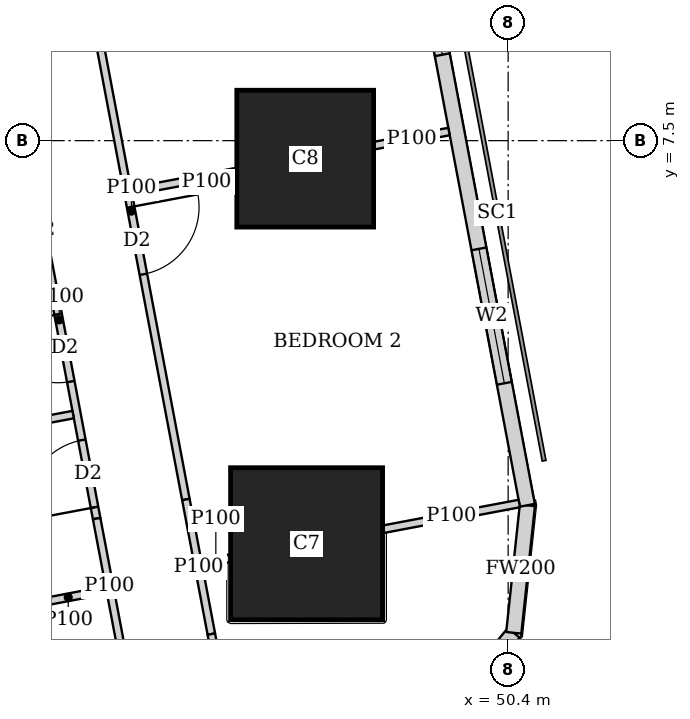
"""IFC4 building model, lengths in metres.
Left out: names, types, materials, properties, quantities, classifications, styles, units other than length and angle.
Written with IfcOpenShell. Run it as: python <this file> out.ifc"""

import sys

from ifc_helpers import new_model, si_unit, direction, frame, frame_2d, origin, origin_2d, place, context, subcontext, project, spatial, rectangle, extrude, element, fill, save


model = new_model("IFC4")
c1 = context("Model", 3, precision=1e-05, world=origin(), true_north=direction((0.0, 1.0)))
c2 = subcontext(c1, "Body", "Model", "MODEL_VIEW")
j1 = project(units=[si_unit("LENGTHUNIT", "METRE"), si_unit("PLANEANGLEUNIT", "RADIAN")], contexts=[c1])
p1 = place(None, origin())
s1 = spatial("IfcSite", under=j1, at=p1, CompositionType="ELEMENT")
p2 = place(p1, origin())
s2 = spatial("IfcBuilding", under=s1, at=p2, CompositionType="ELEMENT")
p3 = place(p2, frame((0.0, 0.0, 180.8)))
s3 = spatial("IfcBuildingStorey", under=s2, at=p3, CompositionType="ELEMENT", Elevation=180.8)
p4 = place(p3, frame((47.748, 2.197, 0.0), z_axis=(0.0, 0.0, 1.0), x_axis=(1.0, 0.0, 0.0)))
e1 = element("IfcColumn", 1, at=p4, inside=s3, PredefinedType="COLUMN", context=c2, shape_type="SweptSolid", body=[
    extrude(rectangle(XDim=2.0, YDim=2.0, at=origin_2d()), origin(), (0.0, 0.0, 1.0), 3.75),
])
p5 = place(p3, frame((47.73, 7.263, 0.0), z_axis=(0.0, 0.0, 1.0), x_axis=(1.0, 0.0, 0.0)))
e2 = element("IfcColumn", 2, at=p5, inside=s3, PredefinedType="COLUMN", context=c2, shape_type="SweptSolid", body=[
    extrude(rectangle(XDim=1.8, YDim=1.8, at=origin_2d()), origin(), (0.0, 0.0, 1.0), 3.75),
])
p6 = place(p3, frame((49.407, -0.263, 0.0), z_axis=(0.0, 0.0, 1.0), x_axis=(0.638042593423, 0.770001070764, 0.0)))
e3 = element("IfcWall", 3, at=p6, inside=s3, PredefinedType="SOLIDWALL", context=c2, shape_type="SweptSolid", body=[
    extrude(rectangle(XDim=1.673, YDim=0.2, at=frame_2d((0.836, 0.0))), origin(), (0.0, 0.0, 1.0), 3.5),
])
p7 = place(p3, frame((50.474, 1.025, 0.0), z_axis=(0.0, 0.0, 1.0), x_axis=(0.106047815515, 0.994361031429, 0.0)))
e4 = element("IfcWall", 4, at=p7, inside=s3, PredefinedType="SOLIDWALL", context=c2, shape_type="SweptSolid", body=[
    extrude(rectangle(XDim=1.688, YDim=0.2, at=frame_2d((0.844, 0.0))), origin(), (0.0, 0.0, 1.0), 3.5),
])
p8 = place(p3, frame((50.653, 2.703, 0.0), z_axis=(0.0, 0.0, 1.0), x_axis=(-0.185612026696, 0.982623109613, 0.0)))
e5 = element("IfcWall", 5, at=p8, inside=s3, PredefinedType="SOLIDWALL", context=c2, shape_type="SweptSolid", body=[
    extrude(rectangle(XDim=41.393, YDim=0.2, at=frame_2d((20.697, 0.0))), origin(), (0.0, 0.0, 1.0), 3.5),
])
p9 = place(p8, frame((1.633, 0.0, 0.9)))
e6 = element("IfcOpeningElement", 6, at=p9, cuts=e5, PredefinedType="OPENING", context=c2, shape_type="SweptSolid", body=[
    extrude(rectangle(XDim=1.8, YDim=1.5, at=frame_2d((0.9, 0.75))), frame((0.0, 0.11, 0.0), z_axis=(0.0, -1.0, 0.0), x_axis=(1.0, 0.0, 0.0)), (0.0, 0.0, 1.0), 0.22),
])
p10 = place(p8, frame((6.032, 0.0, 0.9)))
e7 = element("IfcOpeningElement", 7, at=p10, cuts=e5, PredefinedType="OPENING", context=c2, shape_type="SweptSolid", body=[
    extrude(rectangle(XDim=1.8, YDim=1.5, at=frame_2d((0.9, 0.75))), frame((0.0, 0.11, 0.0), z_axis=(0.0, -1.0, 0.0), x_axis=(1.0, 0.0, 0.0)), (0.0, 0.0, 1.0), 0.22),
])
p11 = place(p8, frame((9.848, 0.0, 0.9)))
e8 = element("IfcOpeningElement", 8, at=p11, cuts=e5, PredefinedType="OPENING", context=c2, shape_type="SweptSolid", body=[
    extrude(rectangle(XDim=1.8, YDim=1.5, at=frame_2d((0.9, 0.75))), frame((0.0, 0.11, 0.0), z_axis=(0.0, -1.0, 0.0), x_axis=(1.0, 0.0, 0.0)), (0.0, 0.0, 1.0), 0.22),
])
p12 = place(p8, frame((13.664, 0.0, 0.9)))
e9 = element("IfcOpeningElement", 9, at=p12, cuts=e5, PredefinedType="OPENING", context=c2, shape_type="SweptSolid", body=[
    extrude(rectangle(XDim=1.8, YDim=1.5, at=frame_2d((0.9, 0.75))), frame((0.0, 0.11, 0.0), z_axis=(0.0, -1.0, 0.0), x_axis=(1.0, 0.0, 0.0)), (0.0, 0.0, 1.0), 0.22),
])
p13 = place(p8, frame((17.481, 0.0, 0.9)))
e10 = element("IfcOpeningElement", 10, at=p13, cuts=e5, PredefinedType="OPENING", context=c2, shape_type="SweptSolid", body=[
    extrude(rectangle(XDim=1.8, YDim=1.5, at=frame_2d((0.9, 0.75))), frame((0.0, 0.11, 0.0), z_axis=(0.0, -1.0, 0.0), x_axis=(1.0, 0.0, 0.0)), (0.0, 0.0, 1.0), 0.22),
])
p14 = place(p8, frame((21.297, 0.0, 0.9)))
e11 = element("IfcOpeningElement", 11, at=p14, cuts=e5, PredefinedType="OPENING", context=c2, shape_type="SweptSolid", body=[
    extrude(rectangle(XDim=1.8, YDim=1.5, at=frame_2d((0.9, 0.75))), frame((0.0, 0.11, 0.0), z_axis=(0.0, -1.0, 0.0), x_axis=(1.0, 0.0, 0.0)), (0.0, 0.0, 1.0), 0.22),
])
p15 = place(p8, frame((25.113, 0.0, 0.9)))
e12 = element("IfcOpeningElement", 12, at=p15, cuts=e5, PredefinedType="OPENING", context=c2, shape_type="SweptSolid", body=[
    extrude(rectangle(XDim=1.8, YDim=1.5, at=frame_2d((0.9, 0.75))), frame((0.0, 0.11, 0.0), z_axis=(0.0, -1.0, 0.0), x_axis=(1.0, 0.0, 0.0)), (0.0, 0.0, 1.0), 0.22),
])
p16 = place(p8, frame((28.93, 0.0, 0.9)))
e13 = element("IfcOpeningElement", 13, at=p16, cuts=e5, PredefinedType="OPENING", context=c2, shape_type="SweptSolid", body=[
    extrude(rectangle(XDim=1.8, YDim=1.5, at=frame_2d((0.9, 0.75))), frame((0.0, 0.11, 0.0), z_axis=(0.0, -1.0, 0.0), x_axis=(1.0, 0.0, 0.0)), (0.0, 0.0, 1.0), 0.22),
])
p17 = place(p8, frame((32.746, 0.0, 0.9)))
e14 = element("IfcOpeningElement", 14, at=p17, cuts=e5, PredefinedType="OPENING", context=c2, shape_type="SweptSolid", body=[
    extrude(rectangle(XDim=1.8, YDim=1.5, at=frame_2d((0.9, 0.75))), frame((0.0, 0.11, 0.0), z_axis=(0.0, -1.0, 0.0), x_axis=(1.0, 0.0, 0.0)), (0.0, 0.0, 1.0), 0.22),
])
p18 = place(p8, frame((36.481, 0.0, 0.9)))
e15 = element("IfcOpeningElement", 15, at=p18, cuts=e5, PredefinedType="OPENING", context=c2, shape_type="SweptSolid", body=[
    extrude(rectangle(XDim=1.8, YDim=1.5, at=frame_2d((0.9, 0.75))), frame((0.0, 0.11, 0.0), z_axis=(0.0, -1.0, 0.0), x_axis=(1.0, 0.0, 0.0)), (0.0, 0.0, 1.0), 0.22),
])
p19 = place(p3, frame((44.727, 10.366, 0.0), z_axis=(0.0, 0.0, 1.0), x_axis=(0.185578957652, -0.982629355595, 0.0)))
e16 = element("IfcWall", 16, at=p19, inside=s3, PredefinedType="PARTITIONING", context=c2, shape_type="SweptSolid", body=[
    extrude(rectangle(XDim=7.721, YDim=0.1, at=frame_2d((3.86, 0.0))), origin(), (0.0, 0.0, 1.0), 3.5),
])
p20 = place(p19, frame((0.151, 0.0, 0.0)))
e17 = element("IfcOpeningElement", 17, at=p20, cuts=e16, PredefinedType="OPENING", context=c2, shape_type="SweptSolid", body=[
    extrude(rectangle(XDim=0.9, YDim=2.1, at=frame_2d((0.45, 1.05))), frame((0.0, 0.06, 0.0), z_axis=(0.0, -1.0, 0.0), x_axis=(1.0, 0.0, 0.0)), (0.0, 0.0, 1.0), 0.12),
])
p21 = place(p19, frame((3.806, 0.0, 0.0)))
e18 = element("IfcOpeningElement", 18, at=p21, cuts=e16, PredefinedType="OPENING", context=c2, shape_type="SweptSolid", body=[
    extrude(rectangle(XDim=0.9, YDim=2.1, at=frame_2d((0.45, 1.05))), frame((0.0, 0.06, 0.0), z_axis=(0.0, -1.0, 0.0), x_axis=(1.0, 0.0, 0.0)), (0.0, 0.0, 1.0), 0.12),
])
p22 = place(p3, frame((46.16, 2.779, 0.0), z_axis=(0.0, 0.0, 1.0), x_axis=(0.18597295662, -0.982554863306, 0.0)))
e19 = element("IfcWall", 19, at=p22, inside=s3, PredefinedType="PARTITIONING", context=c2, shape_type="SweptSolid", body=[
    extrude(rectangle(XDim=1.802, YDim=0.1, at=frame_2d((0.901, 0.0))), origin(), (0.0, 0.0, 1.0), 2.1),
])
p23 = place(p3, frame((46.495, 1.008, 0.0), z_axis=(0.0, 0.0, 1.0), x_axis=(0.185535059532, -0.982637645159, 0.0)))
e20 = element("IfcWall", 20, at=p23, inside=s3, PredefinedType="PARTITIONING", context=c2, shape_type="SweptSolid", body=[
    extrude(rectangle(XDim=1.644, YDim=0.1, at=frame_2d((0.822, 0.0))), origin(), (0.0, 0.0, 1.0), 3.5),
])
p24 = place(p3, frame((43.999, 7.755, 0.0), z_axis=(0.0, 0.0, 1.0), x_axis=(0.185565904578, -0.982631820703, 0.0)))
e21 = element("IfcWall", 21, at=p24, inside=s3, PredefinedType="PARTITIONING", context=c2, shape_type="SweptSolid", body=[
    extrude(rectangle(XDim=5.319, YDim=0.1, at=frame_2d((2.66, 0.0))), origin(), (0.0, 0.0, 1.0), 3.5),
])
p25 = place(p24, frame((1.0, 0.0, 0.0)))
e22 = element("IfcOpeningElement", 22, at=p25, cuts=e21, PredefinedType="OPENING", context=c2, shape_type="SweptSolid", body=[
    extrude(rectangle(XDim=0.9, YDim=2.1, at=frame_2d((0.45, 1.05))), frame((0.0, 0.06, 0.0), z_axis=(0.0, -1.0, 0.0), x_axis=(1.0, 0.0, 0.0)), (0.0, 0.0, 1.0), 0.12),
])
p26 = place(p24, frame((4.269, 0.0, 0.0)))
e23 = element("IfcOpeningElement", 23, at=p26, cuts=e21, PredefinedType="OPENING", context=c2, shape_type="SweptSolid", body=[
    extrude(rectangle(XDim=0.9, YDim=2.1, at=frame_2d((0.45, 1.05))), frame((0.0, 0.06, 0.0), z_axis=(0.0, -1.0, 0.0), x_axis=(1.0, 0.0, 0.0)), (0.0, 0.0, 1.0), 0.12),
])
p27 = place(p24, frame((2.585, 0.0, 0.0)))
e24 = element("IfcOpeningElement", 24, at=p27, cuts=e21, PredefinedType="OPENING", context=c2, shape_type="SweptSolid", body=[
    extrude(rectangle(XDim=0.9, YDim=2.1, at=frame_2d((0.45, 1.05))), frame((0.0, 0.06, 0.0), z_axis=(0.0, -1.0, 0.0), x_axis=(1.0, 0.0, 0.0)), (0.0, 0.0, 1.0), 0.12),
])
p28 = place(p3, frame((44.986, 2.528, 0.0), z_axis=(0.0, 0.0, 1.0), x_axis=(0.18584218627, -0.982579605835, 0.0)))
e25 = element("IfcWall", 25, at=p28, inside=s3, PredefinedType="PARTITIONING", context=c2, shape_type="SweptSolid", body=[
    extrude(rectangle(XDim=1.802, YDim=0.1, at=frame_2d((0.901, 0.0))), origin(), (0.0, 0.0, 1.0), 2.1),
])
p29 = place(p3, frame((49.622, 7.62, 0.0), z_axis=(0.0, 0.0, 1.0), x_axis=(-0.982708646087, -0.185158626332, 0.0)))
e26 = element("IfcWall", 26, at=p29, inside=s3, PredefinedType="PARTITIONING", context=c2, shape_type="SweptSolid", body=[
    extrude(rectangle(XDim=1.0, YDim=0.1, at=frame_2d((0.5, 0.0))), origin(), (0.0, 0.0, 1.0), 3.5),
])
p30 = place(p3, frame((46.82, 7.091, 0.0), z_axis=(0.0, 0.0, 1.0), x_axis=(-0.982689853246, -0.185258339427, 0.0)))
e27 = element("IfcWall", 27, at=p30, inside=s3, PredefinedType="PARTITIONING", context=c2, shape_type="SweptSolid", body=[
    extrude(rectangle(XDim=1.398, YDim=0.1, at=frame_2d((0.699, 0.0))), origin(), (0.0, 0.0, 1.0), 3.5),
])
p31 = place(p3, frame((50.547, 2.726, 0.0), z_axis=(0.0, 0.0, 1.0), x_axis=(-0.982603988143, -0.185713226471, 0.0)))
e28 = element("IfcWall", 28, at=p31, inside=s3, PredefinedType="PARTITIONING", context=c2, shape_type="SweptSolid", body=[
    extrude(rectangle(XDim=1.821, YDim=0.1, at=frame_2d((0.91, 0.0))), origin(), (0.0, 0.0, 1.0), 3.5),
])
p32 = place(p3, frame((46.738, 2.006, 0.0), z_axis=(0.0, 0.0, 1.0), x_axis=(-0.982820466874, -0.184564161994, 0.0)))
e29 = element("IfcWall", 29, at=p32, inside=s3, PredefinedType="PARTITIONING", context=c2, shape_type="SweptSolid", body=[
    extrude(rectangle(XDim=0.374, YDim=0.1, at=frame_2d((0.187, 0.0))), origin(), (0.0, 0.0, 1.0), 2.1),
])
p33 = place(p3, frame((45.114, 1.587, 0.0), z_axis=(0.0, 0.0, 1.0), x_axis=(-0.982567886437, -0.185904138047, 0.0)))
e30 = element("IfcWall", 30, at=p33, inside=s3, PredefinedType="PARTITIONING", context=c2, shape_type="SweptSolid", body=[
    extrude(rectangle(XDim=1.022, YDim=0.1, at=frame_2d((0.511, 0.0))), origin(), (0.0, 0.0, 1.0), 2.1),
])
p34 = place(p3, frame((44.677, 3.896, 0.0), z_axis=(0.0, 0.0, 1.0), x_axis=(-0.982638553676, -0.185530247748, 0.0)))
e31 = element("IfcWall", 31, at=p34, inside=s3, PredefinedType="PARTITIONING", context=c2, shape_type="SweptSolid", body=[
    extrude(rectangle(XDim=3.525, YDim=0.1, at=frame_2d((1.763, 0.0))), origin(), (0.0, 0.0, 1.0), 3.5),
])
p35 = place(p9, origin())
e32 = element("IfcWindow", 32, at=p35, inside=s3, PartitioningType="SINGLE_PANEL", PredefinedType="WINDOW", context=c2, shape_type="SweptSolid", body=[
    extrude(rectangle(XDim=1.8, YDim=1.5, at=frame_2d((0.9, 0.75))), frame((0.0, 0.03, 0.0), z_axis=(0.0, -1.0, 0.0), x_axis=(1.0, 0.0, 0.0)), (0.0, 0.0, 1.0), 0.06),
])
fill(e6, e32)
p36 = place(p10, origin())
e33 = element("IfcWindow", 33, at=p36, inside=s3, PartitioningType="SINGLE_PANEL", PredefinedType="WINDOW", context=c2, shape_type="SweptSolid", body=[
    extrude(rectangle(XDim=1.8, YDim=1.5, at=frame_2d((0.9, 0.75))), frame((0.0, 0.03, 0.0), z_axis=(0.0, -1.0, 0.0), x_axis=(1.0, 0.0, 0.0)), (0.0, 0.0, 1.0), 0.06),
])
fill(e7, e33)
p37 = place(p21, origin())
e34 = element("IfcDoor", 34, at=p37, inside=s3, OperationType="SINGLE_SWING_LEFT", PredefinedType="DOOR", context=c2, shape_type="SweptSolid", body=[
    extrude(rectangle(XDim=0.9, YDim=2.1, at=frame_2d((0.45, 1.05))), frame((0.0, 0.025, 0.0), z_axis=(0.0, -1.0, 0.0), x_axis=(1.0, 0.0, 0.0)), (0.0, 0.0, 1.0), 0.05),
])
fill(e18, e34)
p38 = place(p26, origin())
e35 = element("IfcDoor", 35, at=p38, inside=s3, OperationType="SINGLE_SWING_LEFT", PredefinedType="DOOR", context=c2, shape_type="SweptSolid", body=[
    extrude(rectangle(XDim=0.9, YDim=2.1, at=frame_2d((0.45, 1.05))), frame((0.0, 0.025, 0.0), z_axis=(0.0, -1.0, 0.0), x_axis=(1.0, 0.0, 0.0)), (0.0, 0.0, 1.0), 0.05),
])
fill(e23, e35)
p39 = place(p27, origin())
e36 = element("IfcDoor", 36, at=p39, inside=s3, OperationType="SINGLE_SWING_RIGHT", PredefinedType="DOOR", context=c2, shape_type="SweptSolid", body=[
    extrude(rectangle(XDim=0.9, YDim=2.1, at=frame_2d((0.45, 1.05))), frame((0.0, 0.025, 0.0), z_axis=(0.0, -1.0, 0.0), x_axis=(1.0, 0.0, 0.0)), (0.0, 0.0, 1.0), 0.05),
])
fill(e24, e36)
save(model, sys.argv[1])
